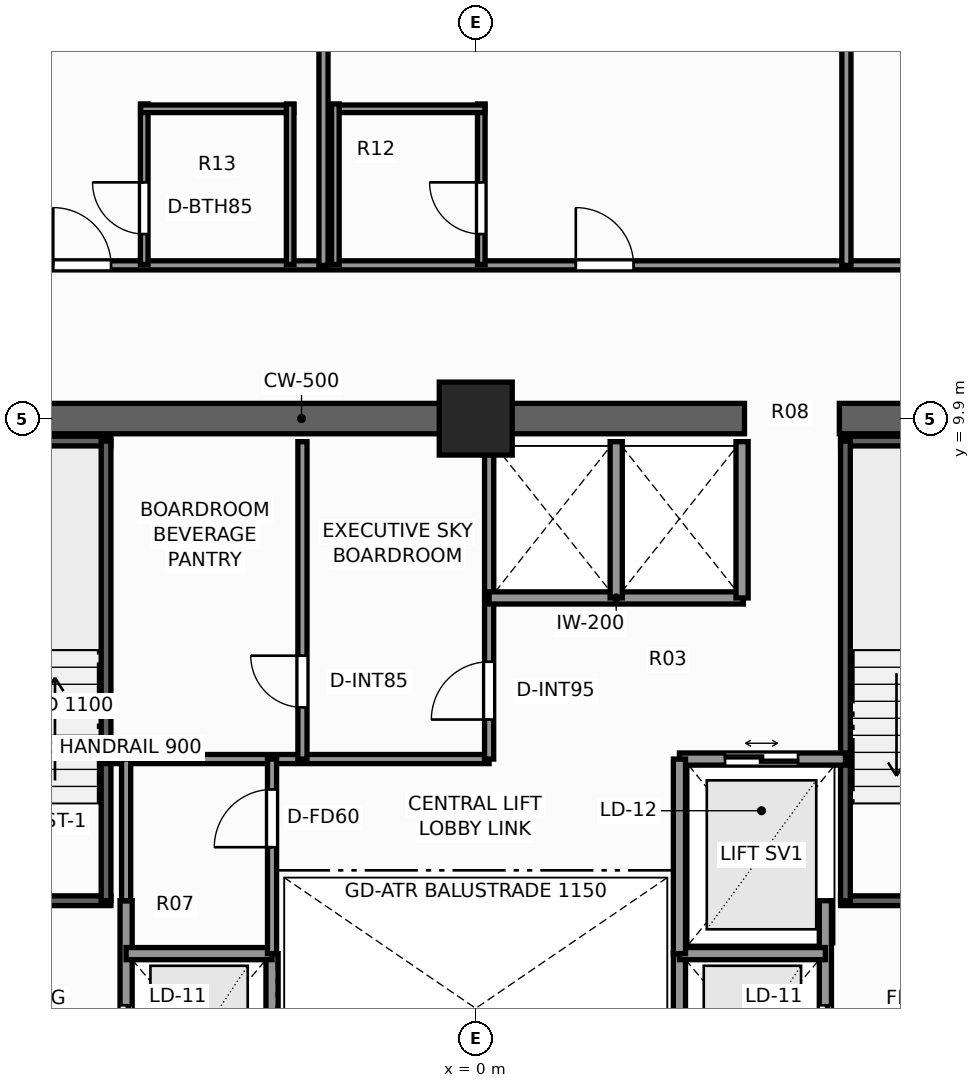
"""IFC4 building model, lengths in metres.
Left out: names, types, materials, properties, quantities, classifications, styles, units other than length and angle.
Written with IfcOpenShell. Run it as: python <this file> out.ifc"""

import sys

from ifc_helpers import new_model, si_unit, direction, frame, frame_2d, origin, origin_2d, place, context, subcontext, project, spatial, rectangle, extrude, element, fill, save


model = new_model("IFC4")
c1 = context("Model", 3, precision=1e-05, world=origin(), true_north=direction((0.0, 1.0)))
c2 = subcontext(c1, "Body", "Model", "MODEL_VIEW")
j1 = project(units=[si_unit("LENGTHUNIT", "METRE"), si_unit("PLANEANGLEUNIT", "RADIAN")], contexts=[c1])
p1 = place(None, origin())
s1 = spatial("IfcSite", under=j1, at=p1, CompositionType="ELEMENT")
p2 = place(p1, origin())
s2 = spatial("IfcBuilding", under=s1, at=p2, CompositionType="ELEMENT")
p3 = place(p2, frame((0.0, 0.0, 180.0)))
s3 = spatial("IfcBuildingStorey", under=s2, at=p3, CompositionType="ELEMENT", Elevation=180.0)
p4 = place(p3, frame((-10.15, 9.9, 0.0), z_axis=(0.0, 0.0, 1.0), x_axis=(1.0, 0.0, 0.0)))
e1 = element("IfcWall", 1, at=p4, inside=s3, PredefinedType="SHEAR", context=c2, shape_type="SweptSolid", body=[
    extrude(rectangle(XDim=14.57, YDim=0.5, at=frame_2d((7.285, 0.0))), origin(), (0.0, 0.0, 1.0), 3.3),
])
p5 = place(p3, frame((5.98, 9.9, 0.0), z_axis=(0.0, 0.0, 1.0), x_axis=(1.0, 0.0, 0.0)))
e2 = element("IfcWall", 2, at=p5, inside=s3, PredefinedType="SHEAR", context=c2, shape_type="SweptSolid", body=[
    extrude(rectangle(XDim=4.17, YDim=0.5, at=frame_2d((2.085, 0.0))), origin(), (0.0, 0.0, 1.0), 3.3),
])
p6 = place(p3, frame((0.0, 9.9, 0.0), z_axis=(0.0, 0.0, 1.0), x_axis=(1.0, 0.0, 0.0)))
e3 = element("IfcColumn", 3, at=p6, inside=s3, PredefinedType="COLUMN", context=c2, shape_type="SweptSolid", body=[
    extrude(rectangle(XDim=1.2, YDim=1.2, at=origin_2d()), origin(), (0.0, 0.0, 1.0), 3.3),
])
p7 = place(p3, frame((-9.52, 1.97, 0.0), z_axis=(0.0, 0.0, 1.0), x_axis=(1.0, 0.0, 0.0)))
e4 = element("IfcWall", 4, at=p7, inside=s3, PredefinedType="SHEAR", context=c2, shape_type="SweptSolid", body=[
    extrude(rectangle(XDim=3.52, YDim=0.16, at=frame_2d((1.76, 0.0))), origin(), (0.0, 0.0, 1.0), 3.3),
])
p8 = place(p7, frame((1.15, 0.0, 0.0)))
e5 = element("IfcOpeningElement", 5, at=p8, cuts=e4, PredefinedType="OPENING", context=c2, shape_type="SweptSolid", body=[
    extrude(rectangle(XDim=1.1, YDim=2.2, at=frame_2d((0.55, 1.1))), frame((0.0, 0.09, 0.0), z_axis=(0.0, -1.0, 0.0), x_axis=(1.0, 0.0, 0.0)), (0.0, 0.0, 1.0), 0.18),
])
p9 = place(p3, frame((-9.52, 9.53, 0.0), z_axis=(0.0, 0.0, 1.0), x_axis=(1.0, 0.0, 0.0)))
e6 = element("IfcWall", 6, at=p9, inside=s3, PredefinedType="SHEAR", context=c2, shape_type="SweptSolid", body=[
    extrude(rectangle(XDim=3.52, YDim=0.16, at=frame_2d((1.76, 0.0))), origin(), (0.0, 0.0, 1.0), 3.3),
])
p10 = place(p3, frame((-6.08, 1.97, 0.0), z_axis=(0.0, 0.0, 1.0), x_axis=(0.0, 1.0, 0.0)))
e7 = element("IfcWall", 7, at=p10, inside=s3, PredefinedType="SHEAR", context=c2, shape_type="SweptSolid", body=[
    extrude(rectangle(XDim=7.56, YDim=0.16, at=frame_2d((3.78, 0.0))), origin(), (0.0, 0.0, 1.0), 3.3),
])
p11 = place(p3, frame((6.0, 1.97, 0.0), z_axis=(0.0, 0.0, 1.0), x_axis=(1.0, 0.0, 0.0)))
e8 = element("IfcWall", 8, at=p11, inside=s3, PredefinedType="SHEAR", context=c2, shape_type="SweptSolid", body=[
    extrude(rectangle(XDim=3.52, YDim=0.16, at=frame_2d((1.76, 0.0))), origin(), (0.0, 0.0, 1.0), 3.3),
])
p12 = place(p11, frame((1.15, 0.0, 0.0)))
e9 = element("IfcOpeningElement", 9, at=p12, cuts=e8, PredefinedType="OPENING", context=c2, shape_type="SweptSolid", body=[
    extrude(rectangle(XDim=1.1, YDim=2.2, at=frame_2d((0.55, 1.1))), frame((0.0, 0.09, 0.0), z_axis=(0.0, -1.0, 0.0), x_axis=(1.0, 0.0, 0.0)), (0.0, 0.0, 1.0), 0.18),
])
p13 = place(p3, frame((6.0, 9.53, 0.0), z_axis=(0.0, 0.0, 1.0), x_axis=(1.0, 0.0, 0.0)))
e10 = element("IfcWall", 10, at=p13, inside=s3, PredefinedType="SHEAR", context=c2, shape_type="SweptSolid", body=[
    extrude(rectangle(XDim=3.52, YDim=0.16, at=frame_2d((1.76, 0.0))), origin(), (0.0, 0.0, 1.0), 3.3),
])
p14 = place(p3, frame((6.08, 1.97, 0.0), z_axis=(0.0, 0.0, 1.0), x_axis=(0.0, 1.0, 0.0)))
e11 = element("IfcWall", 11, at=p14, inside=s3, PredefinedType="SHEAR", context=c2, shape_type="SweptSolid", body=[
    extrude(rectangle(XDim=7.56, YDim=0.16, at=frame_2d((3.78, 0.0))), origin(), (0.0, 0.0, 1.0), 3.3),
])
p15 = place(p3, frame((-5.75, -3.6, 0.0), z_axis=(0.0, 0.0, 1.0), x_axis=(0.0, 1.0, 0.0)))
e12 = element("IfcWall", 12, at=p15, inside=s3, PredefinedType="SOLIDWALL", context=c2, shape_type="SweptSolid", body=[
    extrude(rectangle(XDim=5.57, YDim=0.2, at=frame_2d((2.785, 0.0))), origin(), (0.0, 0.0, 1.0), 2.715),
])
p16 = place(p15, frame((2.75, 0.0, 0.0)))
e13 = element("IfcOpeningElement", 13, at=p16, cuts=e12, PredefinedType="OPENING", context=c2, shape_type="SweptSolid", body=[
    extrude(rectangle(XDim=1.1, YDim=2.2, at=frame_2d((0.55, 1.1))), frame((0.0, 0.11, 0.0), z_axis=(0.0, -1.0, 0.0), x_axis=(1.0, 0.0, 0.0)), (0.0, 0.0, 1.0), 0.22),
])
p17 = place(p3, frame((-3.35, -1.7, 0.0), z_axis=(0.0, 0.0, 1.0), x_axis=(0.0, 1.0, 0.0)))
e14 = element("IfcWall", 14, at=p17, inside=s3, PredefinedType="SOLIDWALL", context=c2, shape_type="SweptSolid", body=[
    extrude(rectangle(XDim=2.8, YDim=0.2, at=frame_2d((1.4, 0.0))), origin(), (0.0, 0.0, 1.0), 2.715),
])
p18 = place(p3, frame((-5.75, 1.1, 0.0), z_axis=(0.0, 0.0, 1.0), x_axis=(1.0, 0.0, 0.0)))
e15 = element("IfcWall", 15, at=p18, inside=s3, PredefinedType="SOLIDWALL", context=c2, shape_type="SweptSolid", body=[
    extrude(rectangle(XDim=2.4, YDim=0.2, at=frame_2d((1.2, 0.0))), origin(), (0.0, 0.0, 1.0), 3.08),
])
p19 = place(p3, frame((5.75, -3.6, 0.0), z_axis=(0.0, 0.0, 1.0), x_axis=(0.0, 1.0, 0.0)))
e16 = element("IfcWall", 16, at=p19, inside=s3, PredefinedType="SOLIDWALL", context=c2, shape_type="SweptSolid", body=[
    extrude(rectangle(XDim=5.57, YDim=0.2, at=frame_2d((2.785, 0.0))), origin(), (0.0, 0.0, 1.0), 2.715),
])
p20 = place(p19, frame((2.75, 0.0, 0.0)))
e17 = element("IfcOpeningElement", 17, at=p20, cuts=e16, PredefinedType="OPENING", context=c2, shape_type="SweptSolid", body=[
    extrude(rectangle(XDim=1.1, YDim=2.2, at=frame_2d((0.55, 1.1))), frame((0.0, 0.11, 0.0), z_axis=(0.0, -1.0, 0.0), x_axis=(1.0, 0.0, 0.0)), (0.0, 0.0, 1.0), 0.22),
])
p21 = place(p3, frame((3.35, -1.7, 0.0), z_axis=(0.0, 0.0, 1.0), x_axis=(0.0, 1.0, 0.0)))
e18 = element("IfcWall", 18, at=p21, inside=s3, PredefinedType="SOLIDWALL", context=c2, shape_type="SweptSolid", body=[
    extrude(rectangle(XDim=2.8, YDim=0.2, at=frame_2d((1.4, 0.0))), origin(), (0.0, 0.0, 1.0), 2.715),
])
p22 = place(p3, frame((3.35, 1.1, 0.0), z_axis=(0.0, 0.0, 1.0), x_axis=(1.0, 0.0, 0.0)))
e19 = element("IfcWall", 19, at=p22, inside=s3, PredefinedType="SOLIDWALL", context=c2, shape_type="SweptSolid", body=[
    extrude(rectangle(XDim=2.4, YDim=0.2, at=frame_2d((1.2, 0.0))), origin(), (0.0, 0.0, 1.0), 3.08),
])
p23 = place(p3, frame((3.35, 4.3, 0.0), z_axis=(0.0, 0.0, 1.0), x_axis=(1.0, 0.0, 0.0)))
e20 = element("IfcWall", 20, at=p23, inside=s3, PredefinedType="SOLIDWALL", context=c2, shape_type="SweptSolid", body=[
    extrude(rectangle(XDim=2.73, YDim=0.2, at=frame_2d((1.365, 0.0))), origin(), (0.0, 0.0, 1.0), 3.08),
])
p24 = place(p23, frame((0.75, 0.0, 0.0)))
e21 = element("IfcOpeningElement", 21, at=p24, cuts=e20, PredefinedType="OPENING", context=c2, shape_type="SweptSolid", body=[
    extrude(rectangle(XDim=1.2, YDim=2.25, at=frame_2d((0.6, 1.125))), frame((0.0, 0.11, 0.0), z_axis=(0.0, -1.0, 0.0), x_axis=(1.0, 0.0, 0.0)), (0.0, 0.0, 1.0), 0.22),
])
p25 = place(p3, frame((3.35, 1.1, 0.0), z_axis=(0.0, 0.0, 1.0), x_axis=(0.0, 1.0, 0.0)))
e22 = element("IfcWall", 22, at=p25, inside=s3, PredefinedType="SOLIDWALL", context=c2, shape_type="SweptSolid", body=[
    extrude(rectangle(XDim=3.2, YDim=0.2, at=frame_2d((1.6, 0.0))), origin(), (0.0, 0.0, 1.0), 2.715),
])
p26 = place(p3, frame((-6.08, 4.3, 0.0), z_axis=(0.0, 0.0, 1.0), x_axis=(1.0, 0.0, 0.0)))
e23 = element("IfcWall", 23, at=p26, inside=s3, PredefinedType="PARTITIONING", context=c2, shape_type="SweptSolid", body=[
    extrude(rectangle(XDim=6.3, YDim=0.15, at=frame_2d((3.15, 0.0))), origin(), (0.0, 0.0, 1.0), 3.08),
])
p27 = place(p3, frame((0.22, 4.3, 0.0), z_axis=(0.0, 0.0, 1.0), x_axis=(0.0, 1.0, 0.0)))
e24 = element("IfcWall", 24, at=p27, inside=s3, PredefinedType="PARTITIONING", context=c2, shape_type="SweptSolid", body=[
    extrude(rectangle(XDim=5.22, YDim=0.15, at=frame_2d((2.61, 0.0))), origin(), (0.0, 0.0, 1.0), 3.08),
])
p28 = place(p27, frame((0.65, 0.0, 0.0)))
e25 = element("IfcOpeningElement", 25, at=p28, cuts=e24, PredefinedType="OPENING", context=c2, shape_type="SweptSolid", body=[
    extrude(rectangle(XDim=0.95, YDim=2.06, at=frame_2d((0.475, 1.03))), frame((0.0, 0.085, 0.0), z_axis=(0.0, -1.0, 0.0), x_axis=(1.0, 0.0, 0.0)), (0.0, 0.0, 1.0), 0.17),
])
p29 = place(p3, frame((-2.85, 4.3, 0.0), z_axis=(0.0, 0.0, 1.0), x_axis=(0.0, 1.0, 0.0)))
e26 = element("IfcWall", 26, at=p29, inside=s3, PredefinedType="PARTITIONING", context=c2, shape_type="SweptSolid", body=[
    extrude(rectangle(XDim=5.22, YDim=0.15, at=frame_2d((2.61, 0.0))), origin(), (0.0, 0.0, 1.0), 3.08),
])
p30 = place(p29, frame((0.85, 0.0, 0.0)))
e27 = element("IfcOpeningElement", 27, at=p30, cuts=e26, PredefinedType="OPENING", context=c2, shape_type="SweptSolid", body=[
    extrude(rectangle(XDim=0.85, YDim=2.03, at=frame_2d((0.425, 1.015))), frame((0.0, 0.085, 0.0), z_axis=(0.0, -1.0, 0.0), x_axis=(1.0, 0.0, 0.0)), (0.0, 0.0, 1.0), 0.17),
])
p31 = place(p3, frame((0.22, 6.95, 0.0), z_axis=(0.0, 0.0, 1.0), x_axis=(1.0, 0.0, 0.0)))
e28 = element("IfcWall", 28, at=p31, inside=s3, PredefinedType="SOLIDWALL", context=c2, shape_type="SweptSolid", body=[
    extrude(rectangle(XDim=4.18, YDim=0.2, at=frame_2d((2.09, 0.0))), origin(), (0.0, 0.0, 1.0), 3.08),
])
for number, where, z_axis, x_axis in (
    (29, (4.38, 6.95, 0.0), (0.0, 0.0, 1.0), (0.0, 1.0, 0.0)),
    (30, (2.31, 6.95, 0.0), (0.0, 0.0, 1.0), (0.0, 1.0, 0.0)),
):
    element("IfcWall", number, at=place(p3, frame(where, z_axis=z_axis, x_axis=x_axis)), inside=s3, PredefinedType="SOLIDWALL", context=c2, shape_type="SweptSolid", body=[
        extrude(rectangle(XDim=2.57, YDim=0.2, at=frame_2d((1.285, 0.0))), origin(), (0.0, 0.0, 1.0), 3.08),
    ])
p32 = place(p3, frame((-3.35, 1.1, 0.0), z_axis=(0.0, 0.0, 1.0), x_axis=(0.0, 1.0, 0.0)))
e31 = element("IfcWall", 31, at=p32, inside=s3, PredefinedType="PARTITIONING", context=c2, shape_type="SweptSolid", body=[
    extrude(rectangle(XDim=3.2, YDim=0.15, at=frame_2d((1.6, 0.0))), origin(), (0.0, 0.0, 1.0), 2.715),
])
p33 = place(p32, frame((1.75, 0.0, 0.0)))
e32 = element("IfcOpeningElement", 32, at=p33, cuts=e31, PredefinedType="OPENING", context=c2, shape_type="SweptSolid", body=[
    extrude(rectangle(XDim=0.95, YDim=2.06, at=frame_2d((0.475, 1.03))), frame((0.0, 0.085, 0.0), z_axis=(0.0, -1.0, 0.0), x_axis=(1.0, 0.0, 0.0)), (0.0, 0.0, 1.0), 0.17),
])
p34 = place(p3, frame((-5.75, 1.97, 0.0), z_axis=(0.0, 0.0, 1.0), x_axis=(0.0, 1.0, 0.0)))
e33 = element("IfcWall", 33, at=p34, inside=s3, PredefinedType="PARTITIONING", context=c2, shape_type="SweptSolid", body=[
    extrude(rectangle(XDim=2.33, YDim=0.15, at=frame_2d((1.165, 0.0))), origin(), (0.0, 0.0, 1.0), 2.715),
])
p35 = place(p3, frame((-12.26, 12.42, 0.0), z_axis=(0.0, 0.0, 1.0), x_axis=(1.0, 0.0, 0.0)))
e34 = element("IfcWall", 34, at=p35, inside=s3, PredefinedType="PARTITIONING", context=c2, shape_type="SweptSolid", body=[
    extrude(rectangle(XDim=24.84, YDim=0.15, at=frame_2d((12.42, 0.0))), origin(), (0.0, 0.0, 1.0), 2.369),
])
p36 = place(p35, frame((3.448, 0.0, 0.0)))
e35 = element("IfcOpeningElement", 35, at=p36, cuts=e34, PredefinedType="OPENING", context=c2, shape_type="SweptSolid", body=[
    extrude(rectangle(XDim=0.95, YDim=2.06, at=frame_2d((0.475, 1.03))), frame((0.0, 0.085, 0.0), z_axis=(0.0, -1.0, 0.0), x_axis=(1.0, 0.0, 0.0)), (0.0, 0.0, 1.0), 0.17),
])
p37 = place(p35, frame((5.312, 0.0, 0.0)))
e36 = element("IfcOpeningElement", 36, at=p37, cuts=e34, PredefinedType="OPENING", context=c2, shape_type="SweptSolid", body=[
    extrude(rectangle(XDim=0.95, YDim=2.06, at=frame_2d((0.475, 1.03))), frame((0.0, 0.085, 0.0), z_axis=(0.0, -1.0, 0.0), x_axis=(1.0, 0.0, 0.0)), (0.0, 0.0, 1.0), 0.17),
])
p38 = place(p35, frame((13.906, 0.0, 0.0)))
e37 = element("IfcOpeningElement", 37, at=p38, cuts=e34, PredefinedType="OPENING", context=c2, shape_type="SweptSolid", body=[
    extrude(rectangle(XDim=0.95, YDim=2.06, at=frame_2d((0.475, 1.03))), frame((0.0, 0.085, 0.0), z_axis=(0.0, -1.0, 0.0), x_axis=(1.0, 0.0, 0.0)), (0.0, 0.0, 1.0), 0.17),
])
p39 = place(p35, frame((19.666, 0.0, 0.0)))
e38 = element("IfcOpeningElement", 38, at=p39, cuts=e34, PredefinedType="OPENING", context=c2, shape_type="SweptSolid", body=[
    extrude(rectangle(XDim=0.95, YDim=2.06, at=frame_2d((0.475, 1.03))), frame((0.0, 0.085, 0.0), z_axis=(0.0, -1.0, 0.0), x_axis=(1.0, 0.0, 0.0)), (0.0, 0.0, 1.0), 0.17),
])
p40 = place(p3, frame((-2.504, 12.42, 0.0), z_axis=(0.0, 0.0, 1.0), x_axis=(0.0, 1.0, 0.0)))
e39 = element("IfcWall", 39, at=p40, inside=s3, PredefinedType="PARTITIONING", context=c2, shape_type="SweptSolid", body=[
    extrude(rectangle(XDim=7.96, YDim=0.15, at=frame_2d((3.98, 0.0))), origin(), (0.0, 0.0, 1.0), 2.453),
])
p41 = place(p3, frame((-5.452, 12.435, 0.0), z_axis=(0.0, 0.0, 1.0), x_axis=(0.0, 1.0, 0.0)))
e40 = element("IfcWall", 40, at=p41, inside=s3, PredefinedType="PARTITIONING", context=c2, shape_type="SweptSolid", body=[
    extrude(rectangle(XDim=2.64, YDim=0.125, at=frame_2d((1.32, 0.0))), origin(), (0.0, 0.0, 1.0), 3.08),
])
p42 = place(p41, frame((0.5, 0.0, 0.0)))
e41 = element("IfcOpeningElement", 41, at=p42, cuts=e40, PredefinedType="OPENING", context=c2, shape_type="SweptSolid", body=[
    extrude(rectangle(XDim=0.85, YDim=2.03, at=frame_2d((0.425, 1.015))), frame((0.0, 0.073, 0.0), z_axis=(0.0, -1.0, 0.0), x_axis=(1.0, 0.0, 0.0)), (0.0, 0.0, 1.0), 0.145),
])
p43 = place(p3, frame((-5.512, 14.995, 0.0), z_axis=(0.0, 0.0, 1.0), x_axis=(1.0, 0.0, 0.0)))
e42 = element("IfcWall", 42, at=p43, inside=s3, PredefinedType="PARTITIONING", context=c2, shape_type="SweptSolid", body=[
    extrude(rectangle(XDim=2.52, YDim=0.125, at=frame_2d((1.26, 0.0))), origin(), (0.0, 0.0, 1.0), 2.369),
])
p44 = place(p3, frame((-3.052, 12.435, 0.0), z_axis=(0.0, 0.0, 1.0), x_axis=(0.0, 1.0, 0.0)))
e43 = element("IfcWall", 43, at=p44, inside=s3, PredefinedType="PARTITIONING", context=c2, shape_type="SweptSolid", body=[
    extrude(rectangle(XDim=2.64, YDim=0.125, at=frame_2d((1.32, 0.0))), origin(), (0.0, 0.0, 1.0), 3.08),
])
p45 = place(p3, frame((6.096, 12.42, 0.0), z_axis=(0.0, 0.0, 1.0), x_axis=(0.0, 1.0, 0.0)))
e44 = element("IfcWall", 44, at=p45, inside=s3, PredefinedType="PARTITIONING", context=c2, shape_type="SweptSolid", body=[
    extrude(rectangle(XDim=7.96, YDim=0.15, at=frame_2d((3.98, 0.0))), origin(), (0.0, 0.0, 1.0), 2.453),
])
p46 = place(p3, frame((0.091, 12.435, 0.0), z_axis=(0.0, 0.0, 1.0), x_axis=(0.0, 1.0, 0.0)))
e45 = element("IfcWall", 45, at=p46, inside=s3, PredefinedType="PARTITIONING", context=c2, shape_type="SweptSolid", body=[
    extrude(rectangle(XDim=2.64, YDim=0.125, at=frame_2d((1.32, 0.0))), origin(), (0.0, 0.0, 1.0), 2.605),
])
p47 = place(p46, frame((0.5, 0.0, 0.0)))
e46 = element("IfcOpeningElement", 46, at=p47, cuts=e45, PredefinedType="OPENING", context=c2, shape_type="SweptSolid", body=[
    extrude(rectangle(XDim=0.85, YDim=2.03, at=frame_2d((0.425, 1.015))), frame((0.0, 0.073, 0.0), z_axis=(0.0, -1.0, 0.0), x_axis=(1.0, 0.0, 0.0)), (0.0, 0.0, 1.0), 0.145),
])
p48 = place(p3, frame((-2.369, 14.995, 0.0), z_axis=(0.0, 0.0, 1.0), x_axis=(1.0, 0.0, 0.0)))
e47 = element("IfcWall", 47, at=p48, inside=s3, PredefinedType="PARTITIONING", context=c2, shape_type="SweptSolid", body=[
    extrude(rectangle(XDim=2.52, YDim=0.125, at=frame_2d((1.26, 0.0))), origin(), (0.0, 0.0, 1.0), 2.605),
])
p49 = place(p3, frame((-2.309, 12.435, 0.0), z_axis=(0.0, 0.0, 1.0), x_axis=(0.0, 1.0, 0.0)))
e48 = element("IfcWall", 48, at=p49, inside=s3, PredefinedType="PARTITIONING", context=c2, shape_type="SweptSolid", body=[
    extrude(rectangle(XDim=2.64, YDim=0.125, at=frame_2d((1.32, 0.0))), origin(), (0.0, 0.0, 1.0), 3.08),
])
p50 = place(p16, origin())
e49 = element("IfcDoor", 49, at=p50, inside=s3, OperationType="DOUBLE_DOOR_SLIDING", PredefinedType="DOOR", context=c2, shape_type="SweptSolid", body=[
    extrude(rectangle(XDim=1.1, YDim=2.2, at=frame_2d((0.55, 1.1))), frame((0.0, 0.025, 0.0), z_axis=(0.0, -1.0, 0.0), x_axis=(1.0, 0.0, 0.0)), (0.0, 0.0, 1.0), 0.05),
])
fill(e13, e49)
p51 = place(p20, origin())
e50 = element("IfcDoor", 50, at=p51, inside=s3, OperationType="DOUBLE_DOOR_SLIDING", PredefinedType="DOOR", context=c2, shape_type="SweptSolid", body=[
    extrude(rectangle(XDim=1.1, YDim=2.2, at=frame_2d((0.55, 1.1))), frame((0.0, 0.025, 0.0), z_axis=(0.0, -1.0, 0.0), x_axis=(1.0, 0.0, 0.0)), (0.0, 0.0, 1.0), 0.05),
])
fill(e17, e50)
p52 = place(p24, origin())
e51 = element("IfcDoor", 51, at=p52, inside=s3, OperationType="DOUBLE_DOOR_SLIDING", PredefinedType="DOOR", context=c2, shape_type="SweptSolid", body=[
    extrude(rectangle(XDim=1.2, YDim=2.25, at=frame_2d((0.6, 1.125))), frame((0.0, 0.025, 0.0), z_axis=(0.0, -1.0, 0.0), x_axis=(1.0, 0.0, 0.0)), (0.0, 0.0, 1.0), 0.05),
])
fill(e21, e51)
p53 = place(p28, origin())
e52 = element("IfcDoor", 52, at=p53, inside=s3, OperationType="SINGLE_SWING_LEFT", PredefinedType="DOOR", context=c2, shape_type="SweptSolid", body=[
    extrude(rectangle(XDim=0.95, YDim=2.06, at=frame_2d((0.475, 1.03))), frame((0.0, 0.025, 0.0), z_axis=(0.0, -1.0, 0.0), x_axis=(1.0, 0.0, 0.0)), (0.0, 0.0, 1.0), 0.05),
])
fill(e25, e52)
p54 = place(p30, origin())
e53 = element("IfcDoor", 53, at=p54, inside=s3, OperationType="SINGLE_SWING_RIGHT", PredefinedType="DOOR", context=c2, shape_type="SweptSolid", body=[
    extrude(rectangle(XDim=0.85, YDim=2.03, at=frame_2d((0.425, 1.015))), frame((0.0, 0.025, 0.0), z_axis=(0.0, -1.0, 0.0), x_axis=(1.0, 0.0, 0.0)), (0.0, 0.0, 1.0), 0.05),
])
fill(e27, e53)
p55 = place(p33, origin())
e54 = element("IfcDoor", 54, at=p55, inside=s3, OperationType="SINGLE_SWING_LEFT", PredefinedType="DOOR", context=c2, shape_type="SweptSolid", body=[
    extrude(rectangle(XDim=0.95, YDim=2.06, at=frame_2d((0.475, 1.03))), frame((0.0, 0.025, 0.0), z_axis=(0.0, -1.0, 0.0), x_axis=(1.0, 0.0, 0.0)), (0.0, 0.0, 1.0), 0.05),
])
fill(e32, e54)
p56 = place(p42, origin())
e55 = element("IfcDoor", 55, at=p56, inside=s3, OperationType="SINGLE_SWING_RIGHT", PredefinedType="DOOR", context=c2, shape_type="SweptSolid", body=[
    extrude(rectangle(XDim=0.85, YDim=2.03, at=frame_2d((0.425, 1.015))), frame((0.0, 0.025, 0.0), z_axis=(0.0, -1.0, 0.0), x_axis=(1.0, 0.0, 0.0)), (0.0, 0.0, 1.0), 0.05),
])
fill(e41, e55)
p57 = place(p37, origin())
e56 = element("IfcDoor", 56, at=p57, inside=s3, OperationType="SINGLE_SWING_LEFT", PredefinedType="DOOR", context=c2, shape_type="SweptSolid", body=[
    extrude(rectangle(XDim=0.95, YDim=2.06, at=frame_2d((0.475, 1.03))), frame((0.0, 0.025, 0.0), z_axis=(0.0, -1.0, 0.0), x_axis=(1.0, 0.0, 0.0)), (0.0, 0.0, 1.0), 0.05),
])
fill(e36, e56)
p58 = place(p47, origin())
e57 = element("IfcDoor", 57, at=p58, inside=s3, OperationType="SINGLE_SWING_RIGHT", PredefinedType="DOOR", context=c2, shape_type="SweptSolid", body=[
    extrude(rectangle(XDim=0.85, YDim=2.03, at=frame_2d((0.425, 1.015))), frame((0.0, 0.025, 0.0), z_axis=(0.0, -1.0, 0.0), x_axis=(1.0, 0.0, 0.0)), (0.0, 0.0, 1.0), 0.05),
])
fill(e46, e57)
p59 = place(p38, origin())
e58 = element("IfcDoor", 58, at=p59, inside=s3, OperationType="SINGLE_SWING_LEFT", PredefinedType="DOOR", context=c2, shape_type="SweptSolid", body=[
    extrude(rectangle(XDim=0.95, YDim=2.06, at=frame_2d((0.475, 1.03))), frame((0.0, 0.025, 0.0), z_axis=(0.0, -1.0, 0.0), x_axis=(1.0, 0.0, 0.0)), (0.0, 0.0, 1.0), 0.05),
])
fill(e37, e58)
save(model, sys.argv[1])
